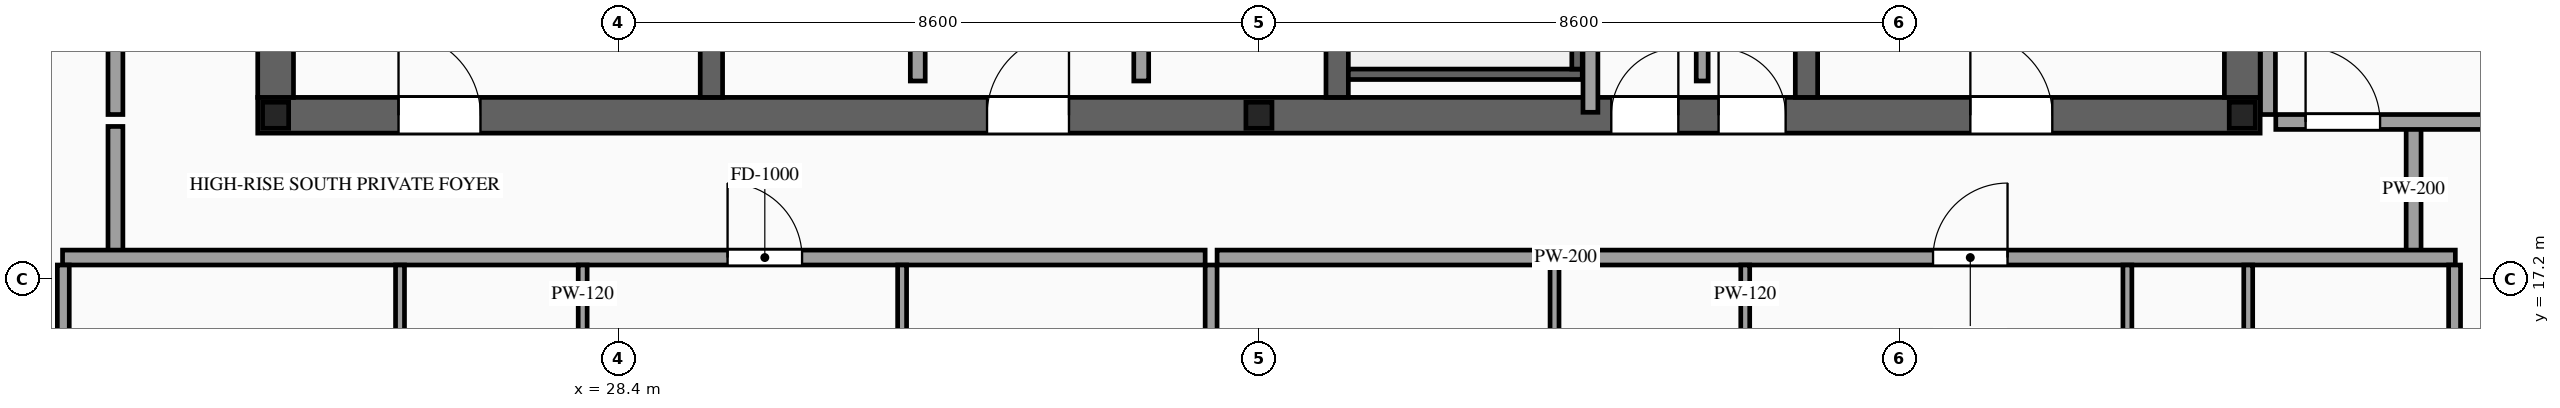
"""IFC4 building model, lengths in metres.
Left out: names, types, materials, properties, quantities, classifications, styles, units other than length and angle.
Written with IfcOpenShell. Run it as: python <this file> out.ifc"""

import sys

from ifc_helpers import new_model, si_unit, direction, frame, frame_2d, origin, origin_2d, place, context, subcontext, project, spatial, rectangle, i_section, extrude, source, transform, mapped, element, fill, save


model = new_model("IFC4")
c1 = context("Model", 3, precision=1e-05, world=origin(), true_north=direction((0.0, 1.0)))
c2 = subcontext(c1, "Body", "Model", "MODEL_VIEW")
j1 = project(units=[si_unit("LENGTHUNIT", "METRE"), si_unit("PLANEANGLEUNIT", "RADIAN")], contexts=[c1])
p1 = place(None, origin())
s1 = spatial("IfcSite", under=j1, at=p1, CompositionType="ELEMENT")
p2 = place(p1, origin())
s2 = spatial("IfcBuilding", under=s1, at=p2, CompositionType="ELEMENT")
p3 = place(p2, frame((0.0, 0.0, 303.1)))
s3 = spatial("IfcBuildingStorey", under=s2, at=p3, CompositionType="ELEMENT", Elevation=303.1)
p4 = place(p3, frame((23.56, 19.4, 0.0), z_axis=(0.0, 0.0, 1.0), x_axis=(1.0, 0.0, 0.0)))
e1 = element("IfcWall", 1, at=p4, inside=s3, PredefinedType="SHEAR", context=c2, shape_type="SweptSolid", body=[
    extrude(rectangle(XDim=26.88, YDim=0.48, at=frame_2d((13.44, 0.0))), origin(), (0.0, 0.0, 1.0), 3.5),
])
p5 = place(p4, frame((1.89, 0.0, 0.0)))
e2 = element("IfcOpeningElement", 2, at=p5, cuts=e1, PredefinedType="OPENING", context=c2, shape_type="SweptSolid", body=[
    extrude(rectangle(XDim=1.1, YDim=2.2, at=frame_2d((0.55, 1.1))), frame((0.0, 0.255, 0.0), z_axis=(0.0, -1.0, 0.0), x_axis=(1.0, 0.0, 0.0)), (0.0, 0.0, 1.0), 0.51),
])
p6 = place(p4, frame((9.79, 0.0, 0.0)))
e3 = element("IfcOpeningElement", 3, at=p6, cuts=e1, PredefinedType="OPENING", context=c2, shape_type="SweptSolid", body=[
    extrude(rectangle(XDim=1.1, YDim=2.2, at=frame_2d((0.55, 1.1))), frame((0.0, 0.255, 0.0), z_axis=(0.0, -1.0, 0.0), x_axis=(1.0, 0.0, 0.0)), (0.0, 0.0, 1.0), 0.51),
])
p7 = place(p4, frame((22.99, 0.0, 0.0)))
e4 = element("IfcOpeningElement", 4, at=p7, cuts=e1, PredefinedType="OPENING", context=c2, shape_type="SweptSolid", body=[
    extrude(rectangle(XDim=1.1, YDim=2.2, at=frame_2d((0.55, 1.1))), frame((0.0, 0.255, 0.0), z_axis=(0.0, -1.0, 0.0), x_axis=(1.0, 0.0, 0.0)), (0.0, 0.0, 1.0), 0.51),
])
p8 = place(p4, frame((19.61, 0.0, 0.0)))
e5 = element("IfcOpeningElement", 5, at=p8, cuts=e1, PredefinedType="OPENING", context=c2, shape_type="SweptSolid", body=[
    extrude(rectangle(XDim=0.9, YDim=2.15, at=frame_2d((0.45, 1.075))), frame((0.0, 0.255, 0.0), z_axis=(0.0, -1.0, 0.0), x_axis=(1.0, 0.0, 0.0)), (0.0, 0.0, 1.0), 0.51),
])
p9 = place(p4, frame((18.17, 0.0, 0.0)))
e6 = element("IfcOpeningElement", 6, at=p9, cuts=e1, PredefinedType="OPENING", context=c2, shape_type="SweptSolid", body=[
    extrude(rectangle(XDim=0.9, YDim=2.15, at=frame_2d((0.45, 1.075))), frame((0.0, 0.255, 0.0), z_axis=(0.0, -1.0, 0.0), x_axis=(1.0, 0.0, 0.0)), (0.0, 0.0, 1.0), 0.51),
])
m1 = source(origin(), c2, "Body", "SweptSolid", [
    extrude(rectangle(XDim=12.32, YDim=0.48, at=frame_2d((6.16, 0.0))), origin(), (0.0, 0.0, 1.0), 3.5),
])
for number, where, z_axis, x_axis in (
    (7, (23.8, 19.64, 0.0), (0.0, 0.0, 1.0), (0.0, 1.0, 0.0)),
    (8, (50.2, 19.64, 0.0), (0.0, 0.0, 1.0), (0.0, 1.0, 0.0)),
):
    element("IfcWall", number, at=place(p3, frame(where, z_axis=z_axis, x_axis=x_axis)), inside=s3, PredefinedType="SHEAR", context=c2, shape_type="MappedRepresentation", body=[
        mapped(m1, transform((0.0, 0.0, 0.0), scale=1.0)),
    ])
m2 = source(origin(), c2, "Body", "SweptSolid", [
    extrude(rectangle(XDim=12.32, YDim=0.3, at=frame_2d((6.16, 0.0))), origin(), (0.0, 0.0, 1.0), 3.5),
])
for number, where, z_axis, x_axis in (
    (9, (29.65, 19.64, 0.0), (0.0, 0.0, 1.0), (0.0, 1.0, 0.0)),
    (10, (38.05, 19.64, 0.0), (0.0, 0.0, 1.0), (0.0, 1.0, 0.0)),
):
    element("IfcWall", number, at=place(p3, frame(where, z_axis=z_axis, x_axis=x_axis)), inside=s3, PredefinedType="SOLIDWALL", context=c2, shape_type="MappedRepresentation", body=[
        mapped(m2, transform((0.0, 0.0, 0.0), scale=1.0)),
    ])
p10 = place(p3, frame((44.35, 19.64, 0.0), z_axis=(0.0, 0.0, 1.0), x_axis=(0.0, 1.0, 0.0)))
e11 = element("IfcWall", 11, at=p10, inside=s3, PredefinedType="SOLIDWALL", context=c2, shape_type="SweptSolid", body=[
    extrude(rectangle(XDim=12.32, YDim=0.3, at=frame_2d((6.16, 0.0))), origin(), (0.0, 0.0, 1.0), 3.5),
])
p11 = place(p10, frame((6.56, 0.0, 0.0)))
e12 = element("IfcOpeningElement", 12, at=p11, cuts=e11, PredefinedType="OPENING", context=c2, shape_type="SweptSolid", body=[
    extrude(rectangle(XDim=1.1, YDim=2.2, at=frame_2d((0.55, 1.1))), frame((0.0, 0.165, 0.0), z_axis=(0.0, -1.0, 0.0), x_axis=(1.0, 0.0, 0.0)), (0.0, 0.0, 1.0), 0.33),
])
p12 = place(p10, frame((8.66, 0.0, 0.0)))
e13 = element("IfcOpeningElement", 13, at=p12, cuts=e11, PredefinedType="OPENING", context=c2, shape_type="SweptSolid", body=[
    extrude(rectangle(XDim=1.1, YDim=2.2, at=frame_2d((0.55, 1.1))), frame((0.0, 0.165, 0.0), z_axis=(0.0, -1.0, 0.0), x_axis=(1.0, 0.0, 0.0)), (0.0, 0.0, 1.0), 0.33),
])
p13 = place(p10, frame((10.76, 0.0, 0.0)))
e14 = element("IfcOpeningElement", 14, at=p13, cuts=e11, PredefinedType="OPENING", context=c2, shape_type="SweptSolid", body=[
    extrude(rectangle(XDim=1.1, YDim=2.2, at=frame_2d((0.55, 1.1))), frame((0.0, 0.165, 0.0), z_axis=(0.0, -1.0, 0.0), x_axis=(1.0, 0.0, 0.0)), (0.0, 0.0, 1.0), 0.33),
])
m3 = source(origin(), c2, "Body", "SweptSolid", [
    extrude(i_section(OverallWidth=0.35, OverallDepth=0.35, WebThickness=0.012, FlangeThickness=0.019, at=origin_2d()), origin(), (0.0, 0.0, 1.0), 3.5),
])
for number, where, z_axis, x_axis in (
    (15, (23.8, 19.4, 0.0), (0.0, 0.0, 1.0), (1.0, 0.0, 0.0)),
    (16, (37.0, 19.4, 0.0), (0.0, 0.0, 1.0), (1.0, 0.0, 0.0)),
    (17, (50.2, 19.4, 0.0), (0.0, 0.0, 1.0), (1.0, 0.0, 0.0)),
):
    element("IfcColumn", number, at=place(p3, frame(where, z_axis=z_axis, x_axis=x_axis)), inside=s3, PredefinedType="COLUMN", context=c2, shape_type="MappedRepresentation", body=[
        mapped(m3, transform((0.0, 0.0, 0.0), scale=1.0)),
    ])
m4 = source(origin(), c2, "Body", "SweptSolid", [
    extrude(rectangle(XDim=3.14, YDim=0.14, at=frame_2d((1.57, 0.0))), origin(), (0.0, 0.0, 1.0), 3.22),
])
p14 = place(p3, frame((38.2, 19.95, 0.0), z_axis=(0.0, 0.0, 1.0), x_axis=(1.0, 0.0, 0.0)))
e18 = element("IfcWall", 18, at=p14, inside=s3, PredefinedType="SOLIDWALL", context=c2, shape_type="MappedRepresentation", body=[
    mapped(m4, transform((0.0, 0.0, 0.0), scale=1.0)),
])
m5 = source(origin(), c2, "Body", "SweptSolid", [
    extrude(rectangle(XDim=8.94, YDim=0.14, at=frame_2d((4.47, 0.0))), origin(), (0.0, 0.0, 1.0), 3.22),
])
p15 = place(p3, frame((41.27, 20.02, 0.0), z_axis=(0.0, 0.0, 1.0), x_axis=(0.0, 1.0, 0.0)))
e19 = element("IfcWall", 19, at=p15, inside=s3, PredefinedType="SOLIDWALL", context=c2, shape_type="MappedRepresentation", body=[
    mapped(m5, transform((0.0, 0.0, 0.0), scale=1.0)),
])
p16 = place(p3, frame((32.42, 19.86, 0.0), z_axis=(0.0, 0.0, 1.0), x_axis=(0.0, 1.0, 0.0)))
e20 = element("IfcWall", 20, at=p16, inside=s3, PredefinedType="PARTITIONING", context=c2, shape_type="SweptSolid", body=[
    extrude(rectangle(XDim=5.84, YDim=0.2, at=frame_2d((2.92, 0.0))), origin(), (0.0, 0.0, 1.0), 3.22),
])
p17 = place(p16, frame((2.47, 0.0, 0.0)))
e21 = element("IfcOpeningElement", 21, at=p17, cuts=e20, PredefinedType="OPENING", context=c2, shape_type="SweptSolid", body=[
    extrude(rectangle(XDim=0.9, YDim=2.15, at=frame_2d((0.45, 1.075))), frame((0.0, 0.115, 0.0), z_axis=(0.0, -1.0, 0.0), x_axis=(1.0, 0.0, 0.0)), (0.0, 0.0, 1.0), 0.23),
])
p18 = place(p3, frame((35.42, 19.86, 0.0), z_axis=(0.0, 0.0, 1.0), x_axis=(0.0, 1.0, 0.0)))
e22 = element("IfcWall", 22, at=p18, inside=s3, PredefinedType="PARTITIONING", context=c2, shape_type="SweptSolid", body=[
    extrude(rectangle(XDim=2.24, YDim=0.2, at=frame_2d((1.12, 0.0))), origin(), (0.0, 0.0, 1.0), 3.22),
])
p19 = place(p18, frame((0.67, 0.0, 0.0)))
e23 = element("IfcOpeningElement", 23, at=p19, cuts=e22, PredefinedType="OPENING", context=c2, shape_type="SweptSolid", body=[
    extrude(rectangle(XDim=0.9, YDim=2.15, at=frame_2d((0.45, 1.075))), frame((0.0, 0.115, 0.0), z_axis=(0.0, -1.0, 0.0), x_axis=(1.0, 0.0, 0.0)), (0.0, 0.0, 1.0), 0.23),
])
m6 = source(origin(), c2, "Body", "SweptSolid", [
    extrude(rectangle(XDim=1.34, YDim=0.16, at=frame_2d((0.67, 0.0))), origin(), (0.0, 0.0, 1.0), 3.22),
])
p20 = place(p3, frame((42.95, 19.86, 0.0), z_axis=(0.0, 0.0, 1.0), x_axis=(0.0, 1.0, 0.0)))
e24 = element("IfcWall", 24, at=p20, inside=s3, PredefinedType="PARTITIONING", context=c2, shape_type="MappedRepresentation", body=[
    mapped(m6, transform((0.0, 0.0, 0.0), scale=1.0)),
])
m7 = source(origin(), c2, "Body", "SweptSolid", [
    extrude(rectangle(XDim=6.06, YDim=0.2, at=frame_2d((3.03, 0.0))), origin(), (0.0, 0.0, 1.0), 3.22),
])
p21 = place(p3, frame((41.45, 19.44, 0.0), z_axis=(0.0, 0.0, 1.0), x_axis=(0.0, 1.0, 0.0)))
e25 = element("IfcWall", 25, at=p21, inside=s3, PredefinedType="PARTITIONING", context=c2, shape_type="MappedRepresentation", body=[
    mapped(m7, transform((0.0, 0.0, 0.0), scale=1.0)),
])
m8 = source(origin(), c2, "Body", "SweptSolid", [
    extrude(rectangle(XDim=1.7, YDim=0.2, at=frame_2d((0.85, 0.0))), origin(), (0.0, 0.0, 1.0), 3.22),
])
for number, where, z_axis, x_axis in (
    (26, (21.65, 17.55, 0.0), (0.0, 0.0, 1.0), (0.0, 1.0, 0.0)),
    (27, (52.5, 17.55, 0.0), (0.0, 0.0, 1.0), (0.0, 1.0, 0.0)),
):
    element("IfcWall", number, at=place(p3, frame(where, z_axis=z_axis, x_axis=x_axis)), inside=s3, PredefinedType="PARTITIONING", context=c2, shape_type="MappedRepresentation", body=[
        mapped(m8, transform((0.0, 0.0, 0.0), scale=1.0)),
    ])
p22 = place(p3, frame((20.94, 17.49, 0.0), z_axis=(0.0, 0.0, 1.0), x_axis=(1.0, 0.0, 0.0)))
e28 = element("IfcWall", 28, at=p22, inside=s3, PredefinedType="PARTITIONING", context=c2, shape_type="SweptSolid", body=[
    extrude(rectangle(XDim=15.338, YDim=0.2, at=frame_2d((7.669, 0.0))), origin(), (0.0, 0.0, 1.0), 3.22),
])
p23 = place(p22, frame((8.927, 0.0, 0.0)))
e29 = element("IfcOpeningElement", 29, at=p23, cuts=e28, PredefinedType="OPENING", context=c2, shape_type="SweptSolid", body=[
    extrude(rectangle(XDim=1.0, YDim=2.2, at=frame_2d((0.5, 1.1))), frame((0.0, 0.115, 0.0), z_axis=(0.0, -1.0, 0.0), x_axis=(1.0, 0.0, 0.0)), (0.0, 0.0, 1.0), 0.23),
])
m9 = source(origin(), c2, "Body", "SweptSolid", [
    extrude(rectangle(XDim=10.54, YDim=0.16, at=frame_2d((5.27, 0.0))), origin(), (0.0, 0.0, 1.0), 3.22),
])
p24 = place(p3, frame((36.358, 6.85, 0.0), z_axis=(0.0, 0.0, 1.0), x_axis=(0.0, 1.0, 0.0)))
e30 = element("IfcWall", 30, at=p24, inside=s3, PredefinedType="PARTITIONING", context=c2, shape_type="MappedRepresentation", body=[
    mapped(m9, transform((0.0, 0.0, 0.0), scale=1.0)),
])
m10 = source(origin(), c2, "Body", "SweptSolid", [
    extrude(rectangle(XDim=2.9, YDim=0.12, at=frame_2d((1.45, 0.0))), origin(), (0.0, 0.0, 1.0), 3.22),
])
p25 = place(p3, frame((25.47, 14.49, 0.0), z_axis=(0.0, 0.0, 1.0), x_axis=(0.0, 1.0, 0.0)))
e31 = element("IfcWall", 31, at=p25, inside=s3, PredefinedType="PARTITIONING", context=c2, shape_type="MappedRepresentation", body=[
    mapped(m10, transform((0.0, 0.0, 0.0), scale=1.0)),
])
p26 = place(p3, frame((27.922, 14.49, 0.0), z_axis=(0.0, 0.0, 1.0), x_axis=(0.0, 1.0, 0.0)))
e32 = element("IfcWall", 32, at=p26, inside=s3, PredefinedType="PARTITIONING", context=c2, shape_type="SweptSolid", body=[
    extrude(rectangle(XDim=2.9, YDim=0.12, at=frame_2d((1.45, 0.0))), origin(), (0.0, 0.0, 1.0), 3.22),
])
p27 = place(p26, frame((1.025, 0.0, 0.0)))
e33 = element("IfcOpeningElement", 33, at=p27, cuts=e32, PredefinedType="OPENING", context=c2, shape_type="SweptSolid", body=[
    extrude(rectangle(XDim=0.85, YDim=2.1, at=frame_2d((0.425, 1.05))), frame((0.0, 0.075, 0.0), z_axis=(0.0, -1.0, 0.0), x_axis=(1.0, 0.0, 0.0)), (0.0, 0.0, 1.0), 0.15),
])
p28 = place(p3, frame((32.21, 14.49, 0.0), z_axis=(0.0, 0.0, 1.0), x_axis=(0.0, 1.0, 0.0)))
e34 = element("IfcWall", 34, at=p28, inside=s3, PredefinedType="PARTITIONING", context=c2, shape_type="MappedRepresentation", body=[
    mapped(m10, transform((0.0, 0.0, 0.0), scale=1.0)),
])
p29 = place(p3, frame((36.438, 17.49, 0.0), z_axis=(0.0, 0.0, 1.0), x_axis=(1.0, 0.0, 0.0)))
e35 = element("IfcWall", 35, at=p29, inside=s3, PredefinedType="PARTITIONING", context=c2, shape_type="SweptSolid", body=[
    extrude(rectangle(XDim=16.622, YDim=0.2, at=frame_2d((8.311, 0.0))), origin(), (0.0, 0.0, 1.0), 3.22),
])
p30 = place(p29, frame((9.611, 0.0, 0.0)))
e36 = element("IfcOpeningElement", 36, at=p30, cuts=e35, PredefinedType="OPENING", context=c2, shape_type="SweptSolid", body=[
    extrude(rectangle(XDim=1.0, YDim=2.2, at=frame_2d((0.5, 1.1))), frame((0.0, 0.115, 0.0), z_axis=(0.0, -1.0, 0.0), x_axis=(1.0, 0.0, 0.0)), (0.0, 0.0, 1.0), 0.23),
])
m11 = source(origin(), c2, "Body", "SweptSolid", [
    extrude(rectangle(XDim=10.39, YDim=0.16, at=frame_2d((5.195, 0.0))), origin(), (0.0, 0.0, 1.0), 3.22),
])
for number, where, z_axis, x_axis in (
    (37, (20.95, 7.0, 0.0), (0.0, 0.0, 1.0), (0.0, 1.0, 0.0)),
    (38, (53.05, 7.0, 0.0), (0.0, 0.0, 1.0), (0.0, 1.0, 0.0)),
):
    element("IfcWall", number, at=place(p3, frame(where, z_axis=z_axis, x_axis=x_axis)), inside=s3, PredefinedType="PARTITIONING", context=c2, shape_type="MappedRepresentation", body=[
        mapped(m11, transform((0.0, 0.0, 0.0), scale=1.0)),
    ])
p31 = place(p3, frame((40.968, 14.49, 0.0), z_axis=(0.0, 0.0, 1.0), x_axis=(0.0, 1.0, 0.0)))
e39 = element("IfcWall", 39, at=p31, inside=s3, PredefinedType="PARTITIONING", context=c2, shape_type="MappedRepresentation", body=[
    mapped(m10, transform((0.0, 0.0, 0.0), scale=1.0)),
])
p32 = place(p3, frame((43.528, 14.49, 0.0), z_axis=(0.0, 0.0, 1.0), x_axis=(0.0, 1.0, 0.0)))
e40 = element("IfcWall", 40, at=p32, inside=s3, PredefinedType="PARTITIONING", context=c2, shape_type="SweptSolid", body=[
    extrude(rectangle(XDim=2.9, YDim=0.12, at=frame_2d((1.45, 0.0))), origin(), (0.0, 0.0, 1.0), 3.22),
])
p33 = place(p32, frame((1.025, 0.0, 0.0)))
e41 = element("IfcOpeningElement", 41, at=p33, cuts=e40, PredefinedType="OPENING", context=c2, shape_type="SweptSolid", body=[
    extrude(rectangle(XDim=0.85, YDim=2.1, at=frame_2d((0.425, 1.05))), frame((0.0, 0.075, 0.0), z_axis=(0.0, -1.0, 0.0), x_axis=(1.0, 0.0, 0.0)), (0.0, 0.0, 1.0), 0.15),
])
m12 = source(origin(), c2, "Body", "SweptSolid", [
    extrude(rectangle(XDim=2.9, YDim=0.12, at=frame_2d((1.45, 0.0))), origin(), (0.0, 0.0, 1.0), 2.765),
])
p34 = place(p3, frame((50.28, 14.49, 0.0), z_axis=(0.0, 0.0, 1.0), x_axis=(0.0, 1.0, 0.0)))
e42 = element("IfcWall", 42, at=p34, inside=s3, PredefinedType="PARTITIONING", context=c2, shape_type="MappedRepresentation", body=[
    mapped(m12, transform((0.0, 0.0, 0.0), scale=1.0)),
])
p35 = place(p3, frame((48.658, 14.49, 0.0), z_axis=(0.0, 0.0, 1.0), x_axis=(0.0, 1.0, 0.0)))
e43 = element("IfcWall", 43, at=p35, inside=s3, PredefinedType="PARTITIONING", context=c2, shape_type="MappedRepresentation", body=[
    mapped(m10, transform((0.0, 0.0, 0.0), scale=1.0)),
])
p36 = place(p3, frame((21.65, 19.41, 0.0), z_axis=(0.0, 0.0, 1.0), x_axis=(0.0, 1.0, 0.0)))
e44 = element("IfcWall", 44, at=p36, inside=s3, PredefinedType="PARTITIONING", context=c2, shape_type="SweptSolid", body=[
    extrude(rectangle(XDim=12.78, YDim=0.2, at=frame_2d((6.39, 0.0))), origin(), (0.0, 0.0, 1.0), 3.22),
])
p37 = place(p36, frame((5.89, 0.0, 0.0)))
e45 = element("IfcOpeningElement", 45, at=p37, cuts=e44, PredefinedType="OPENING", context=c2, shape_type="SweptSolid", body=[
    extrude(rectangle(XDim=1.0, YDim=2.2, at=frame_2d((0.5, 1.1))), frame((0.0, 0.115, 0.0), z_axis=(0.0, -1.0, 0.0), x_axis=(1.0, 0.0, 0.0)), (0.0, 0.0, 1.0), 0.23),
])
p38 = place(p3, frame((50.65, 19.31, 0.0), z_axis=(0.0, 0.0, 1.0), x_axis=(1.0, 0.0, 0.0)))
e46 = element("IfcWall", 46, at=p38, inside=s3, PredefinedType="PARTITIONING", context=c2, shape_type="SweptSolid", body=[
    extrude(rectangle(XDim=5.3, YDim=0.2, at=frame_2d((2.65, 0.0))), origin(), (0.0, 0.0, 1.0), 2.765),
])
p39 = place(p38, frame((0.4, 0.0, 0.0)))
e47 = element("IfcOpeningElement", 47, at=p39, cuts=e46, PredefinedType="OPENING", context=c2, shape_type="SweptSolid", body=[
    extrude(rectangle(XDim=1.0, YDim=2.2, at=frame_2d((0.5, 1.1))), frame((0.0, 0.115, 0.0), z_axis=(0.0, -1.0, 0.0), x_axis=(1.0, 0.0, 0.0)), (0.0, 0.0, 1.0), 0.23),
])
m13 = source(origin(), c2, "Body", "SweptSolid", [
    extrude(rectangle(XDim=12.78, YDim=0.2, at=frame_2d((6.39, 0.0))), origin(), (0.0, 0.0, 1.0), 3.22),
])
p40 = place(p3, frame((50.545, 19.41, 0.0), z_axis=(0.0, 0.0, 1.0), x_axis=(0.0, 1.0, 0.0)))
e48 = element("IfcWall", 48, at=p40, inside=s3, PredefinedType="PARTITIONING", context=c2, shape_type="MappedRepresentation", body=[
    mapped(m13, transform((0.0, 0.0, 0.0), scale=1.0)),
])
m14 = source(origin(), c2, "Body", "SweptSolid", [
    extrude(rectangle(XDim=1.1, YDim=2.2, at=frame_2d((0.55, 1.1))), frame((0.0, 0.025, 0.0), z_axis=(0.0, -1.0, 0.0), x_axis=(1.0, 0.0, 0.0)), (0.0, 0.0, 1.0), 0.05),
])
p41 = place(p5, origin())
e49 = element("IfcDoor", 49, at=p41, inside=s3, OperationType="SINGLE_SWING_LEFT", PredefinedType="DOOR", context=c2, shape_type="MappedRepresentation", body=[
    mapped(m14, transform((0.0, 0.0, 0.0), scale=1.0)),
])
fill(e2, e49)
p42 = place(p6, origin())
e50 = element("IfcDoor", 50, at=p42, inside=s3, OperationType="SINGLE_SWING_RIGHT", PredefinedType="DOOR", context=c2, shape_type="MappedRepresentation", body=[
    mapped(m14, transform((0.0, 0.0, 0.0), scale=1.0)),
])
fill(e3, e50)
p43 = place(p7, origin())
e51 = element("IfcDoor", 51, at=p43, inside=s3, OperationType="SINGLE_SWING_LEFT", PredefinedType="DOOR", context=c2, shape_type="MappedRepresentation", body=[
    mapped(m14, transform((0.0, 0.0, 0.0), scale=1.0)),
])
fill(e4, e51)
m15 = source(origin(), c2, "Body", "SweptSolid", [
    extrude(rectangle(XDim=0.9, YDim=2.15, at=frame_2d((0.45, 1.075))), frame((0.0, 0.025, 0.0), z_axis=(0.0, -1.0, 0.0), x_axis=(1.0, 0.0, 0.0)), (0.0, 0.0, 1.0), 0.05),
])
p44 = place(p8, origin())
e52 = element("IfcDoor", 52, at=p44, inside=s3, OperationType="SINGLE_SWING_LEFT", PredefinedType="DOOR", context=c2, shape_type="MappedRepresentation", body=[
    mapped(m15, transform((0.0, 0.0, 0.0), scale=1.0)),
])
fill(e5, e52)
p45 = place(p9, origin())
e53 = element("IfcDoor", 53, at=p45, inside=s3, OperationType="SINGLE_SWING_RIGHT", PredefinedType="DOOR", context=c2, shape_type="MappedRepresentation", body=[
    mapped(m15, transform((0.0, 0.0, 0.0), scale=1.0)),
])
fill(e6, e53)
m16 = source(origin(), c2, "Body", "SweptSolid", [
    extrude(rectangle(XDim=1.0, YDim=2.2, at=frame_2d((0.5, 1.1))), frame((0.0, 0.025, 0.0), z_axis=(0.0, -1.0, 0.0), x_axis=(1.0, 0.0, 0.0)), (0.0, 0.0, 1.0), 0.05),
])
p46 = place(p23, origin())
e54 = element("IfcDoor", 54, at=p46, inside=s3, OperationType="SINGLE_SWING_LEFT", PredefinedType="DOOR", context=c2, shape_type="MappedRepresentation", body=[
    mapped(m16, transform((0.0, 0.0, 0.0), scale=1.0)),
])
fill(e29, e54)
p47 = place(p30, origin())
e55 = element("IfcDoor", 55, at=p47, inside=s3, OperationType="SINGLE_SWING_RIGHT", PredefinedType="DOOR", context=c2, shape_type="MappedRepresentation", body=[
    mapped(m16, transform((0.0, 0.0, 0.0), scale=1.0)),
])
fill(e36, e55)
p48 = place(p39, origin())
e56 = element("IfcDoor", 56, at=p48, inside=s3, OperationType="SINGLE_SWING_LEFT", PredefinedType="DOOR", context=c2, shape_type="MappedRepresentation", body=[
    mapped(m16, transform((0.0, 0.0, 0.0), scale=1.0)),
])
fill(e47, e56)
save(model, sys.argv[1])
